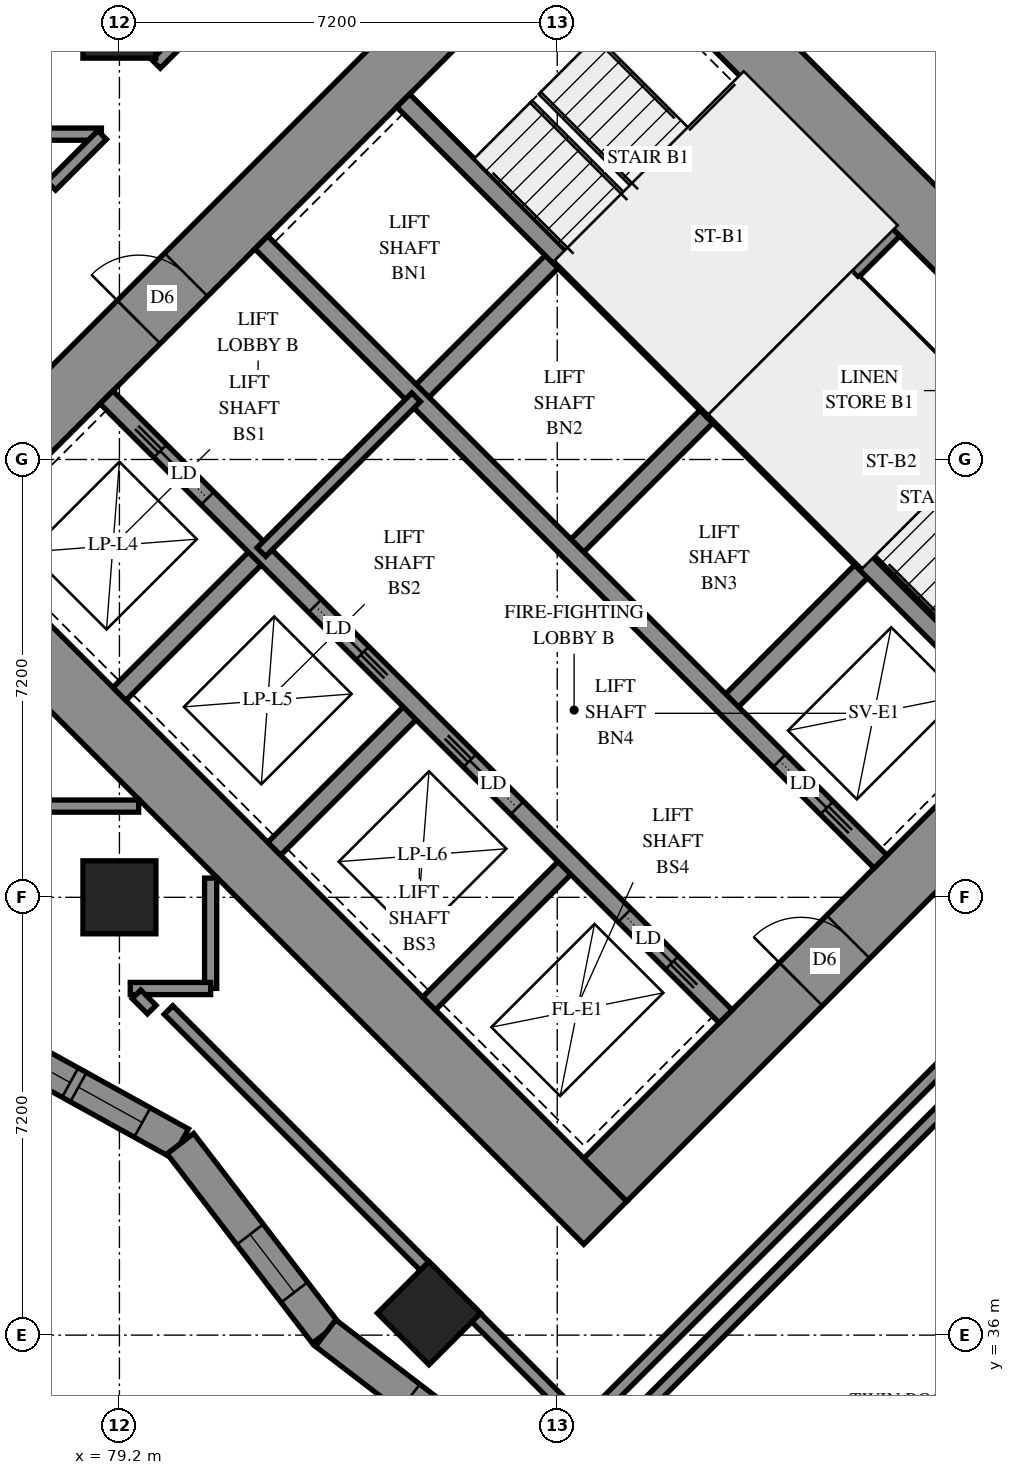
"""IFC4 building model, lengths in metres.
Left out: names, types, materials, properties, quantities, classifications, styles, units other than length and angle.
Written with IfcOpenShell. Run it as: python <this file> out.ifc"""

import sys

from ifc_helpers import new_model, si_unit, direction, frame, frame_2d, origin, origin_2d, place, context, subcontext, project, spatial, polyline, rectangle, outline, extrude, element, fill, save


model = new_model("IFC4")
c1 = context("Model", 3, precision=1e-05, world=origin(), true_north=direction((0.0, 1.0)))
c2 = subcontext(c1, "Body", "Model", "MODEL_VIEW")
j1 = project(units=[si_unit("LENGTHUNIT", "METRE"), si_unit("PLANEANGLEUNIT", "RADIAN")], contexts=[c1])
p1 = place(None, origin())
s1 = spatial("IfcSite", under=j1, at=p1, CompositionType="ELEMENT")
p2 = place(p1, origin())
s2 = spatial("IfcBuilding", under=s1, at=p2, CompositionType="ELEMENT")
p3 = place(p2, frame((0.0, 0.0, 50.8)))
s3 = spatial("IfcBuildingStorey", under=s2, at=p3, CompositionType="ELEMENT", Elevation=50.8)
for number, where, z_axis, x_axis in (
    (1, (79.2, 43.2, 0.0), (0.0, 0.0, 1.0), (1.0, 0.0, 0.0)),
    (2, (79.2, 57.6, 0.0), (0.0, 0.0, 1.0), (1.0, 0.0, 0.0)),
    (3, (84.291, 36.362, 0.0), (0.0, 0.0, 1.0), (0.707, -0.707, 0.0)),
):
    element("IfcColumn", number, at=place(p3, frame(where, z_axis=z_axis, x_axis=x_axis)), inside=s3, PredefinedType="COLUMN", context=c2, shape_type="SweptSolid", body=[
        extrude(rectangle(XDim=1.2, YDim=1.2, at=origin_2d()), origin(), (0.0, 0.0, 1.0), 3.1),
    ])
p4 = place(p3, frame((75.594, 49.443, -0.3), z_axis=(0.0, 0.0, 1.0), x_axis=(0.7071037324, -0.70710983, 0.0)))
e4 = element("IfcWall", 4, at=p4, inside=s3, PredefinedType="SHEAR", context=c2, shape_type="SweptSolid", body=[
    extrude(rectangle(XDim=16.4, YDim=1.0, at=frame_2d((8.2, 0.0))), origin(), (0.0, 0.0, 1.0), 2.7),
])
p5 = place(p3, frame((86.483, 60.333, -0.3), z_axis=(0.0, 0.0, 1.0), x_axis=(0.70710983, -0.7071037324, 0.0)))
e5 = element("IfcWall", 5, at=p5, inside=s3, PredefinedType="SHEAR", context=c2, shape_type="SweptSolid", body=[
    extrude(rectangle(XDim=16.4, YDim=1.0, at=frame_2d((8.2, 0.0))), origin(), (0.0, 0.0, 1.0), 2.7),
])
p6 = place(p5, frame((11.0, 0.0, 0.3)))
e6 = element("IfcOpeningElement", 6, at=p6, cuts=e5, PredefinedType="OPENING", context=c2, shape_type="SweptSolid", body=[
    extrude(rectangle(XDim=0.8, YDim=2.1, at=frame_2d((0.4, 1.05))), frame((0.0, 0.51, 0.0), z_axis=(0.0, -1.0, 0.0), x_axis=(1.0, 0.0, 0.0)), (0.0, 0.0, 1.0), 1.02),
])
p7 = place(p3, frame((76.301, 49.443, -0.3), z_axis=(0.0, 0.0, 1.0), x_axis=(0.7071067812, 0.7071067812, 0.0)))
e7 = element("IfcWall", 7, at=p7, inside=s3, PredefinedType="SHEAR", context=c2, shape_type="SweptSolid", body=[
    extrude(rectangle(XDim=14.4, YDim=1.0, at=frame_2d((7.2, 0.0))), origin(), (0.0, 0.0, 1.0), 2.7),
])
p8 = place(p7, frame((4.55, 0.0, 0.3)))
e8 = element("IfcOpeningElement", 8, at=p8, cuts=e7, PredefinedType="OPENING", context=c2, shape_type="SweptSolid", body=[
    extrude(rectangle(XDim=1.1, YDim=2.1, at=frame_2d((0.55, 1.05))), frame((0.0, 0.51, 0.0), z_axis=(0.0, -1.0, 0.0), x_axis=(1.0, 0.0, 0.0)), (0.0, 0.0, 1.0), 1.02),
])
p9 = place(p7, frame((11.35, 0.0, 0.3)))
e9 = element("IfcOpeningElement", 9, at=p9, cuts=e7, PredefinedType="OPENING", context=c2, shape_type="SweptSolid", body=[
    extrude(rectangle(XDim=1.1, YDim=2.1, at=frame_2d((0.55, 1.05))), frame((0.0, 0.51, 0.0), z_axis=(0.0, -1.0, 0.0), x_axis=(1.0, 0.0, 0.0)), (0.0, 0.0, 1.0), 1.02),
])
p10 = place(p3, frame((87.19, 38.554, -0.3), z_axis=(0.0, 0.0, 1.0), x_axis=(0.707103309, 0.7071102534, 0.0)))
e10 = element("IfcWall", 10, at=p10, inside=s3, PredefinedType="SHEAR", context=c2, shape_type="SweptSolid", body=[
    extrude(rectangle(XDim=14.4, YDim=1.0, at=frame_2d((7.2, 0.0))), origin(), (0.0, 0.0, 1.0), 2.7),
])
p11 = place(p10, frame((4.55, 0.0, 0.3)))
e11 = element("IfcOpeningElement", 11, at=p11, cuts=e10, PredefinedType="OPENING", context=c2, shape_type="SweptSolid", body=[
    extrude(rectangle(XDim=1.1, YDim=2.1, at=frame_2d((0.55, 1.05))), frame((0.0, 0.51, 0.0), z_axis=(0.0, -1.0, 0.0), x_axis=(1.0, 0.0, 0.0)), (0.0, 0.0, 1.0), 1.02),
])
p12 = place(p10, frame((11.35, 0.0, 0.3)))
e12 = element("IfcOpeningElement", 12, at=p12, cuts=e10, PredefinedType="OPENING", context=c2, shape_type="SweptSolid", body=[
    extrude(rectangle(XDim=1.1, YDim=2.1, at=frame_2d((0.55, 1.05))), frame((0.0, 0.51, 0.0), z_axis=(0.0, -1.0, 0.0), x_axis=(1.0, 0.0, 0.0)), (0.0, 0.0, 1.0), 1.02),
])
for number, where, z_axis, x_axis in (
    (13, (79.2, 46.544, 0.0), (0.0, 0.0, 1.0), (0.707, 0.707, 0.0)),
    (14, (84.079, 51.423, 0.0), (0.0, 0.0, 1.0), (0.707, 0.707, 0.0)),
):
    element("IfcWall", number, at=place(p3, frame(where, z_axis=z_axis, x_axis=x_axis)), inside=s3, PredefinedType="SOLIDWALL", context=c2, shape_type="SweptSolid", body=[
        extrude(rectangle(XDim=3.3, YDim=0.3, at=frame_2d((1.65, 0.0))), origin(), (0.0, 0.0, 1.0), 3.1),
    ])
p13 = place(p3, frame((81.746, 43.999, 0.0), z_axis=(0.0, 0.0, 1.0), x_axis=(0.7071067812, 0.7071067812, 0.0)))
e15 = element("IfcWall", 15, at=p13, inside=s3, PredefinedType="SOLIDWALL", context=c2, shape_type="SweptSolid", body=[
    extrude(rectangle(XDim=3.3, YDim=0.3, at=frame_2d((1.65, 0.0))), origin(), (0.0, 0.0, 1.0), 3.1),
])
p14 = place(p3, frame((86.625, 48.878, 0.0), z_axis=(0.0, 0.0, 1.0), x_axis=(0.7071067812, 0.7071067812, 0.0)))
e16 = element("IfcWall", 16, at=p14, inside=s3, PredefinedType="SOLIDWALL", context=c2, shape_type="SweptSolid", body=[
    extrude(rectangle(XDim=3.3, YDim=0.3, at=frame_2d((1.65, 0.0))), origin(), (0.0, 0.0, 1.0), 3.1),
])
p15 = place(p3, frame((84.291, 41.453, 0.0), z_axis=(0.0, 0.0, 1.0), x_axis=(0.7071067812, 0.7071067812, 0.0)))
e17 = element("IfcWall", 17, at=p15, inside=s3, PredefinedType="SOLIDWALL", context=c2, shape_type="SweptSolid", body=[
    extrude(rectangle(XDim=3.3, YDim=0.3, at=frame_2d((1.65, 0.0))), origin(), (0.0, 0.0, 1.0), 3.1),
])
p16 = place(p3, frame((89.17, 46.332, 0.0), z_axis=(0.0, 0.0, 1.0), x_axis=(0.7071067812, 0.7071067812, 0.0)))
e18 = element("IfcWall", 18, at=p16, inside=s3, PredefinedType="SOLIDWALL", context=c2, shape_type="SweptSolid", body=[
    extrude(rectangle(XDim=3.3, YDim=0.3, at=frame_2d((1.65, 0.0))), origin(), (0.0, 0.0, 1.0), 3.1),
])
p17 = place(p3, frame((78.988, 51.423, 0.0), z_axis=(0.0, 0.0, 1.0), x_axis=(0.7071067812, -0.7071067812, 0.0)))
e19 = element("IfcWall", 19, at=p17, inside=s3, PredefinedType="SOLIDWALL", context=c2, shape_type="SweptSolid", body=[
    extrude(rectangle(XDim=14.4, YDim=0.3, at=frame_2d((7.2, 0.0))), origin(), (0.0, 0.0, 1.0), 3.1),
])
p18 = place(p17, frame((1.25, 0.0, 0.0)))
e20 = element("IfcOpeningElement", 20, at=p18, cuts=e19, PredefinedType="OPENING", context=c2, shape_type="SweptSolid", body=[
    extrude(rectangle(XDim=1.1, YDim=2.1, at=frame_2d((0.55, 1.05))), frame((0.0, 0.16, 0.0), z_axis=(0.0, -1.0, 0.0), x_axis=(1.0, 0.0, 0.0)), (0.0, 0.0, 1.0), 0.32),
])
p19 = place(p17, frame((4.85, 0.0, 0.0)))
e21 = element("IfcOpeningElement", 21, at=p19, cuts=e19, PredefinedType="OPENING", context=c2, shape_type="SweptSolid", body=[
    extrude(rectangle(XDim=1.1, YDim=2.1, at=frame_2d((0.55, 1.05))), frame((0.0, 0.16, 0.0), z_axis=(0.0, -1.0, 0.0), x_axis=(1.0, 0.0, 0.0)), (0.0, 0.0, 1.0), 0.32),
])
p20 = place(p17, frame((8.45, 0.0, 0.0)))
e22 = element("IfcOpeningElement", 22, at=p20, cuts=e19, PredefinedType="OPENING", context=c2, shape_type="SweptSolid", body=[
    extrude(rectangle(XDim=1.1, YDim=2.1, at=frame_2d((0.55, 1.05))), frame((0.0, 0.16, 0.0), z_axis=(0.0, -1.0, 0.0), x_axis=(1.0, 0.0, 0.0)), (0.0, 0.0, 1.0), 0.32),
])
p21 = place(p17, frame((12.05, 0.0, 0.0)))
e23 = element("IfcOpeningElement", 23, at=p21, cuts=e19, PredefinedType="OPENING", context=c2, shape_type="SweptSolid", body=[
    extrude(rectangle(XDim=1.1, YDim=2.1, at=frame_2d((0.55, 1.05))), frame((0.0, 0.16, 0.0), z_axis=(0.0, -1.0, 0.0), x_axis=(1.0, 0.0, 0.0)), (0.0, 0.0, 1.0), 0.32),
])
p22 = place(p3, frame((81.534, 53.969, 0.0), z_axis=(0.0, 0.0, 1.0), x_axis=(0.707103309, -0.7071102534, 0.0)))
e24 = element("IfcWall", 24, at=p22, inside=s3, PredefinedType="SOLIDWALL", context=c2, shape_type="SweptSolid", body=[
    extrude(rectangle(XDim=14.4, YDim=0.3, at=frame_2d((7.2, 0.0))), origin(), (0.0, 0.0, 1.0), 3.1),
])
p23 = place(p22, frame((12.05, 0.0, 0.0)))
e25 = element("IfcOpeningElement", 25, at=p23, cuts=e24, PredefinedType="OPENING", context=c2, shape_type="SweptSolid", body=[
    extrude(rectangle(XDim=1.1, YDim=2.1, at=frame_2d((0.55, 1.05))), frame((0.0, 0.16, 0.0), z_axis=(0.0, -1.0, 0.0), x_axis=(1.0, 0.0, 0.0)), (0.0, 0.0, 1.0), 0.32),
])
for number, where, z_axis, x_axis in (
    (26, (83.867, 56.302, 0.0), (0.0, 0.0, 1.0), (0.707, -0.707, 0.0)),
    (27, (88.958, 51.211, 0.0), (0.0, 0.0, 1.0), (0.707, -0.707, 0.0)),
):
    element("IfcWall", number, at=place(p3, frame(where, z_axis=z_axis, x_axis=x_axis)), inside=s3, PredefinedType="SOLIDWALL", context=c2, shape_type="SweptSolid", body=[
        extrude(rectangle(XDim=7.2, YDim=0.3, at=frame_2d((3.6, 0.0))), origin(), (0.0, 0.0, 1.0), 3.1),
    ])
p24 = place(p3, frame((88.958, 51.211, 0.0), z_axis=(0.0, 0.0, 1.0), x_axis=(0.7071067812, 0.7071067812, 0.0)))
e28 = element("IfcWall", 28, at=p24, inside=s3, PredefinedType="SOLIDWALL", context=c2, shape_type="SweptSolid", body=[
    extrude(rectangle(XDim=4.2, YDim=0.3, at=frame_2d((2.1, 0.0))), origin(), (0.0, 0.0, 1.0), 3.1),
])
p25 = place(p3, frame((76.606, 41.141, 0.0), z_axis=(0.0, 0.0, 1.0), x_axis=(0.874845907, -0.4844013201, 0.0)))
e29 = element("IfcWall", 29, at=p25, inside=s3, PredefinedType="SOLIDWALL", context=c2, shape_type="SweptSolid", body=[
    extrude(outline(polyline([(0.026, -0.275), (4.054, -0.275), (4.169, 0.275), (-0.026, 0.275), (0.026, -0.275)])), origin(), (0.0, 0.0, 1.0), 3.1),
])
p26 = place(p25, frame((0.84, 0.0, 0.5)))
e30 = element("IfcOpeningElement", 30, at=p26, cuts=e29, PredefinedType="OPENING", context=c2, shape_type="SweptSolid", body=[
    extrude(rectangle(XDim=1.2, YDim=2.45, at=frame_2d((0.6, 1.225))), frame((0.0, 0.285, 0.0), z_axis=(0.0, -1.0, 0.0), x_axis=(1.0, 0.0, 0.0)), (0.0, 0.0, 1.0), 0.57),
])
p27 = place(p25, frame((2.196, 0.0, 0.5)))
e31 = element("IfcOpeningElement", 31, at=p27, cuts=e29, PredefinedType="OPENING", context=c2, shape_type="SweptSolid", body=[
    extrude(rectangle(XDim=1.2, YDim=2.45, at=frame_2d((0.6, 1.225))), frame((0.0, 0.285, 0.0), z_axis=(0.0, -1.0, 0.0), x_axis=(1.0, 0.0, 0.0)), (0.0, 0.0, 1.0), 0.57),
])
p28 = place(p3, frame((80.202, 39.15, 0.0), z_axis=(0.0, 0.0, 1.0), x_axis=(0.6082855489, -0.7937182693, 0.0)))
e32 = element("IfcWall", 32, at=p28, inside=s3, PredefinedType="SOLIDWALL", context=c2, shape_type="SweptSolid", body=[
    extrude(outline(polyline([(0.057, -0.275), (3.962, -0.275), (3.89, 0.275), (-0.057, 0.275), (0.057, -0.275)])), origin(), (0.0, 0.0, 1.0), 3.1),
])
p29 = place(p28, frame((1.882, 0.0, 0.5)))
e33 = element("IfcOpeningElement", 33, at=p29, cuts=e32, PredefinedType="OPENING", context=c2, shape_type="SweptSolid", body=[
    extrude(rectangle(XDim=1.2, YDim=2.45, at=frame_2d((0.6, 1.225))), frame((0.0, 0.285, 0.0), z_axis=(0.0, -1.0, 0.0), x_axis=(1.0, 0.0, 0.0)), (0.0, 0.0, 1.0), 0.57),
])
p30 = place(p3, frame((82.591, 36.034, 0.0), z_axis=(0.0, 0.0, 1.0), x_axis=(0.7937155717, -0.6082890689, 0.0)))
e34 = element("IfcWall", 34, at=p30, inside=s3, PredefinedType="SOLIDWALL", context=c2, shape_type="SweptSolid", body=[
    extrude(outline(polyline([(-0.036, -0.275), (3.869, -0.275), (3.941, 0.275), (0.036, 0.275), (-0.036, -0.275)])), origin(), (0.0, 0.0, 1.0), 3.1),
])
p31 = place(p30, frame((1.742, 0.0, 0.5)))
e35 = element("IfcOpeningElement", 35, at=p31, cuts=e34, PredefinedType="OPENING", context=c2, shape_type="SweptSolid", body=[
    extrude(rectangle(XDim=1.2, YDim=2.45, at=frame_2d((0.6, 1.225))), frame((0.0, 0.285, 0.0), z_axis=(0.0, -1.0, 0.0), x_axis=(1.0, 0.0, 0.0)), (0.0, 0.0, 1.0), 0.57),
])
p32 = place(p3, frame((91.313, 53.354, 0.0), z_axis=(0.0, 0.0, 1.0), x_axis=(0.7071147811, -0.7070987812, 0.0)))
e36 = element("IfcWall", 36, at=p32, inside=s3, PredefinedType="PARTITIONING", context=c2, shape_type="SweptSolid", body=[
    extrude(rectangle(XDim=6.25, YDim=0.15, at=frame_2d((3.125, 0.0))), origin(), (0.0, 0.0, 1.0), 3.1),
])
p33 = place(p3, frame((81.534, 48.878, 0.0), z_axis=(0.0, 0.0, 1.0), x_axis=(0.707092892, 0.7071206701, 0.0)))
e37 = element("IfcWall", 37, at=p33, inside=s3, PredefinedType="PARTITIONING", context=c2, shape_type="SweptSolid", body=[
    extrude(rectangle(XDim=3.6, YDim=0.2, at=frame_2d((1.8, 0.0))), origin(), (0.0, 0.0, 1.0), 3.1),
])
p34 = place(p3, frame((86.314, 33.295, 0.0), z_axis=(0.0, 0.0, 1.0), x_axis=(0.7071020809, 0.7071114814, 0.0)))
e38 = element("IfcWall", 38, at=p34, inside=s3, PredefinedType="PARTITIONING", context=c2, shape_type="SweptSolid", body=[
    extrude(rectangle(XDim=10.638, YDim=0.2, at=frame_2d((5.319, 0.0))), origin(), (0.0, 0.0, 1.0), 3.1),
])
p35 = place(p3, frame((86.836, 34.524, 0.0), z_axis=(0.0, 0.0, 1.0), x_axis=(0.7071067812, 0.7071067812, 0.0)))
e39 = element("IfcWall", 39, at=p35, inside=s3, PredefinedType="PARTITIONING", context=c2, shape_type="SweptSolid", body=[
    extrude(rectangle(XDim=9.399, YDim=0.2, at=frame_2d((4.699, 0.0))), origin(), (0.0, 0.0, 1.0), 3.1),
])
p36 = place(p3, frame((89.271, 61.215, 0.0), z_axis=(0.0, 0.0, 1.0), x_axis=(0.7071067812, -0.7071067812, 0.0)))
e40 = element("IfcWall", 40, at=p36, inside=s3, PredefinedType="PARTITIONING", context=c2, shape_type="SweptSolid", body=[
    extrude(rectangle(XDim=6.505, YDim=0.2, at=frame_2d((3.253, 0.0))), origin(), (0.0, 0.0, 1.0), 3.1),
])
p37 = place(p3, frame((80.007, 41.347, 0.0), z_axis=(0.0, 0.0, 1.0), x_axis=(0.7071067812, -0.7071067812, 0.0)))
e41 = element("IfcWall", 41, at=p37, inside=s3, PredefinedType="PARTITIONING", context=c2, shape_type="SweptSolid", body=[
    extrude(rectangle(XDim=6.206, YDim=0.2, at=frame_2d((3.103, 0.0))), origin(), (0.0, 0.0, 1.0), 3.1),
])
p38 = place(p3, frame((84.889, 36.465, 0.0), z_axis=(0.0, 0.0, 1.0), x_axis=(0.7071067812, -0.7071067812, 0.0)))
e42 = element("IfcWall", 42, at=p38, inside=s3, PredefinedType="PARTITIONING", context=c2, shape_type="SweptSolid", body=[
    extrude(rectangle(XDim=2.749, YDim=0.2, at=frame_2d((1.375, 0.0))), origin(), (0.0, 0.0, 1.0), 3.1),
])
for number, where, z_axis, x_axis in (
    (43, (77.702, 44.7, 0.0), (0.0, 0.0, 1.0), (1.0, 0.0, 0.0)),
    (44, (80.7, 41.702, 0.0), (0.0, 0.0, 1.0), (0.0, 1.0, 0.0)),
):
    element("IfcWall", number, at=place(p3, frame(where, z_axis=z_axis, x_axis=x_axis)), inside=s3, PredefinedType="PARTITIONING", context=c2, shape_type="SweptSolid", body=[
        extrude(rectangle(XDim=1.814, YDim=0.2, at=frame_2d((0.907, 0.0))), origin(), (0.0, 0.0, 1.0), 3.1),
    ])
p39 = place(p3, frame((79.801, 56.905, 0.0), z_axis=(0.0, 0.0, 1.0), x_axis=(0.7071067812, 0.7071067812, 0.0)))
e45 = element("IfcWall", 45, at=p39, inside=s3, PredefinedType="PARTITIONING", context=c2, shape_type="SweptSolid", body=[
    extrude(rectangle(XDim=1.765, YDim=0.2, at=frame_2d((0.882, 0.0))), origin(), (0.0, 0.0, 1.0), 3.1),
])
p40 = place(p3, frame((77.352, 55.75, 0.0), z_axis=(0.0, 0.0, 1.0), x_axis=(1.0, 0.0, 0.0)))
e46 = element("IfcWall", 46, at=p40, inside=s3, PredefinedType="PARTITIONING", context=c2, shape_type="SweptSolid", body=[
    extrude(rectangle(XDim=1.552, YDim=0.2, at=frame_2d((0.776, 0.0))), origin(), (0.0, 0.0, 1.0), 3.1),
])
p41 = place(p3, frame((79.378, 41.7, 0.0), z_axis=(0.0, 0.0, 1.0), x_axis=(1.0, 0.0, 0.0)))
e47 = element("IfcWall", 47, at=p41, inside=s3, PredefinedType="PARTITIONING", context=c2, shape_type="SweptSolid", body=[
    extrude(rectangle(XDim=1.322, YDim=0.2, at=frame_2d((0.661, 0.0))), origin(), (0.0, 0.0, 1.0), 3.1),
])
p42 = place(p3, frame((78.079, 54.901, 0.0), z_axis=(0.0, 0.0, 1.0), x_axis=(0.7071067812, 0.7071067812, 0.0)))
e48 = element("IfcWall", 48, at=p42, inside=s3, PredefinedType="PARTITIONING", context=c2, shape_type="SweptSolid", body=[
    extrude(rectangle(XDim=1.182, YDim=0.2, at=frame_2d((0.591, 0.0))), origin(), (0.0, 0.0, 1.0), 3.1),
])
p43 = place(p3, frame((79.481, 41.605, 0.0), z_axis=(0.0, 0.0, 1.0), x_axis=(0.7071067812, -0.7071067812, 0.0)))
e49 = element("IfcWall", 49, at=p43, inside=s3, PredefinedType="PARTITIONING", context=c2, shape_type="SweptSolid", body=[
    extrude(rectangle(XDim=0.355, YDim=0.2, at=frame_2d((0.177, 0.0))), origin(), (0.0, 0.0, 1.0), 3.1),
])
p44 = place(p26, origin())
e50 = element("IfcWindow", 50, at=p44, inside=s3, PartitioningType="SINGLE_PANEL", PredefinedType="WINDOW", context=c2, shape_type="SweptSolid", body=[
    extrude(rectangle(XDim=1.2, YDim=2.45, at=frame_2d((0.6, 1.225))), frame((0.0, 0.155, 0.0), z_axis=(0.0, -1.0, 0.0), x_axis=(1.0, 0.0, 0.0)), (0.0, 0.0, 1.0), 0.06),
])
fill(e30, e50)
p45 = place(p27, origin())
e51 = element("IfcWindow", 51, at=p45, inside=s3, PartitioningType="SINGLE_PANEL", PredefinedType="WINDOW", context=c2, shape_type="SweptSolid", body=[
    extrude(rectangle(XDim=1.2, YDim=2.45, at=frame_2d((0.6, 1.225))), frame((0.0, 0.155, 0.0), z_axis=(0.0, -1.0, 0.0), x_axis=(1.0, 0.0, 0.0)), (0.0, 0.0, 1.0), 0.06),
])
fill(e31, e51)
p46 = place(p29, origin())
e52 = element("IfcWindow", 52, at=p46, inside=s3, PartitioningType="SINGLE_PANEL", PredefinedType="WINDOW", context=c2, shape_type="SweptSolid", body=[
    extrude(rectangle(XDim=1.2, YDim=2.45, at=frame_2d((0.6, 1.225))), frame((0.0, 0.155, 0.0), z_axis=(0.0, -1.0, 0.0), x_axis=(1.0, 0.0, 0.0)), (0.0, 0.0, 1.0), 0.06),
])
fill(e33, e52)
p47 = place(p31, origin())
e53 = element("IfcWindow", 53, at=p47, inside=s3, PartitioningType="SINGLE_PANEL", PredefinedType="WINDOW", context=c2, shape_type="SweptSolid", body=[
    extrude(rectangle(XDim=1.2, YDim=2.45, at=frame_2d((0.6, 1.225))), frame((0.0, 0.155, 0.0), z_axis=(0.0, -1.0, 0.0), x_axis=(1.0, 0.0, 0.0)), (0.0, 0.0, 1.0), 0.06),
])
fill(e35, e53)
p48 = place(p8, origin())
e54 = element("IfcDoor", 54, at=p48, inside=s3, OperationType="DOUBLE_DOOR_SINGLE_SWING", PredefinedType="DOOR", context=c2, shape_type="SweptSolid", body=[
    extrude(rectangle(XDim=1.1, YDim=2.1, at=frame_2d((0.55, 1.05))), frame((0.0, 0.025, 0.0), z_axis=(0.0, -1.0, 0.0), x_axis=(1.0, 0.0, 0.0)), (0.0, 0.0, 1.0), 0.05),
])
fill(e8, e54)
p49 = place(p11, origin())
e55 = element("IfcDoor", 55, at=p49, inside=s3, OperationType="DOUBLE_DOOR_SINGLE_SWING", PredefinedType="DOOR", context=c2, shape_type="SweptSolid", body=[
    extrude(rectangle(XDim=1.1, YDim=2.1, at=frame_2d((0.55, 1.05))), frame((0.0, 0.025, 0.0), z_axis=(0.0, -1.0, 0.0), x_axis=(1.0, 0.0, 0.0)), (0.0, 0.0, 1.0), 0.05),
])
fill(e11, e55)
p50 = place(p18, origin())
e56 = element("IfcDoor", 56, at=p50, inside=s3, OperationType="SLIDING_TO_LEFT", PredefinedType="DOOR", context=c2, shape_type="SweptSolid", body=[
    extrude(rectangle(XDim=1.1, YDim=2.1, at=frame_2d((0.55, 1.05))), frame((0.0, 0.025, 0.0), z_axis=(0.0, -1.0, 0.0), x_axis=(1.0, 0.0, 0.0)), (0.0, 0.0, 1.0), 0.05),
])
fill(e20, e56)
p51 = place(p19, origin())
e57 = element("IfcDoor", 57, at=p51, inside=s3, OperationType="SLIDING_TO_RIGHT", PredefinedType="DOOR", context=c2, shape_type="SweptSolid", body=[
    extrude(rectangle(XDim=1.1, YDim=2.1, at=frame_2d((0.55, 1.05))), frame((0.0, 0.025, 0.0), z_axis=(0.0, -1.0, 0.0), x_axis=(1.0, 0.0, 0.0)), (0.0, 0.0, 1.0), 0.05),
])
fill(e21, e57)
p52 = place(p20, origin())
e58 = element("IfcDoor", 58, at=p52, inside=s3, OperationType="SLIDING_TO_LEFT", PredefinedType="DOOR", context=c2, shape_type="SweptSolid", body=[
    extrude(rectangle(XDim=1.1, YDim=2.1, at=frame_2d((0.55, 1.05))), frame((0.0, 0.025, 0.0), z_axis=(0.0, -1.0, 0.0), x_axis=(1.0, 0.0, 0.0)), (0.0, 0.0, 1.0), 0.05),
])
fill(e22, e58)
p53 = place(p21, origin())
e59 = element("IfcDoor", 59, at=p53, inside=s3, OperationType="SLIDING_TO_RIGHT", PredefinedType="DOOR", context=c2, shape_type="SweptSolid", body=[
    extrude(rectangle(XDim=1.1, YDim=2.1, at=frame_2d((0.55, 1.05))), frame((0.0, 0.025, 0.0), z_axis=(0.0, -1.0, 0.0), x_axis=(1.0, 0.0, 0.0)), (0.0, 0.0, 1.0), 0.05),
])
fill(e23, e59)
p54 = place(p23, origin())
e60 = element("IfcDoor", 60, at=p54, inside=s3, OperationType="SLIDING_TO_RIGHT", PredefinedType="DOOR", context=c2, shape_type="SweptSolid", body=[
    extrude(rectangle(XDim=1.1, YDim=2.1, at=frame_2d((0.55, 1.05))), frame((0.0, 0.025, 0.0), z_axis=(0.0, -1.0, 0.0), x_axis=(1.0, 0.0, 0.0)), (0.0, 0.0, 1.0), 0.05),
])
fill(e25, e60)
save(model, sys.argv[1])
